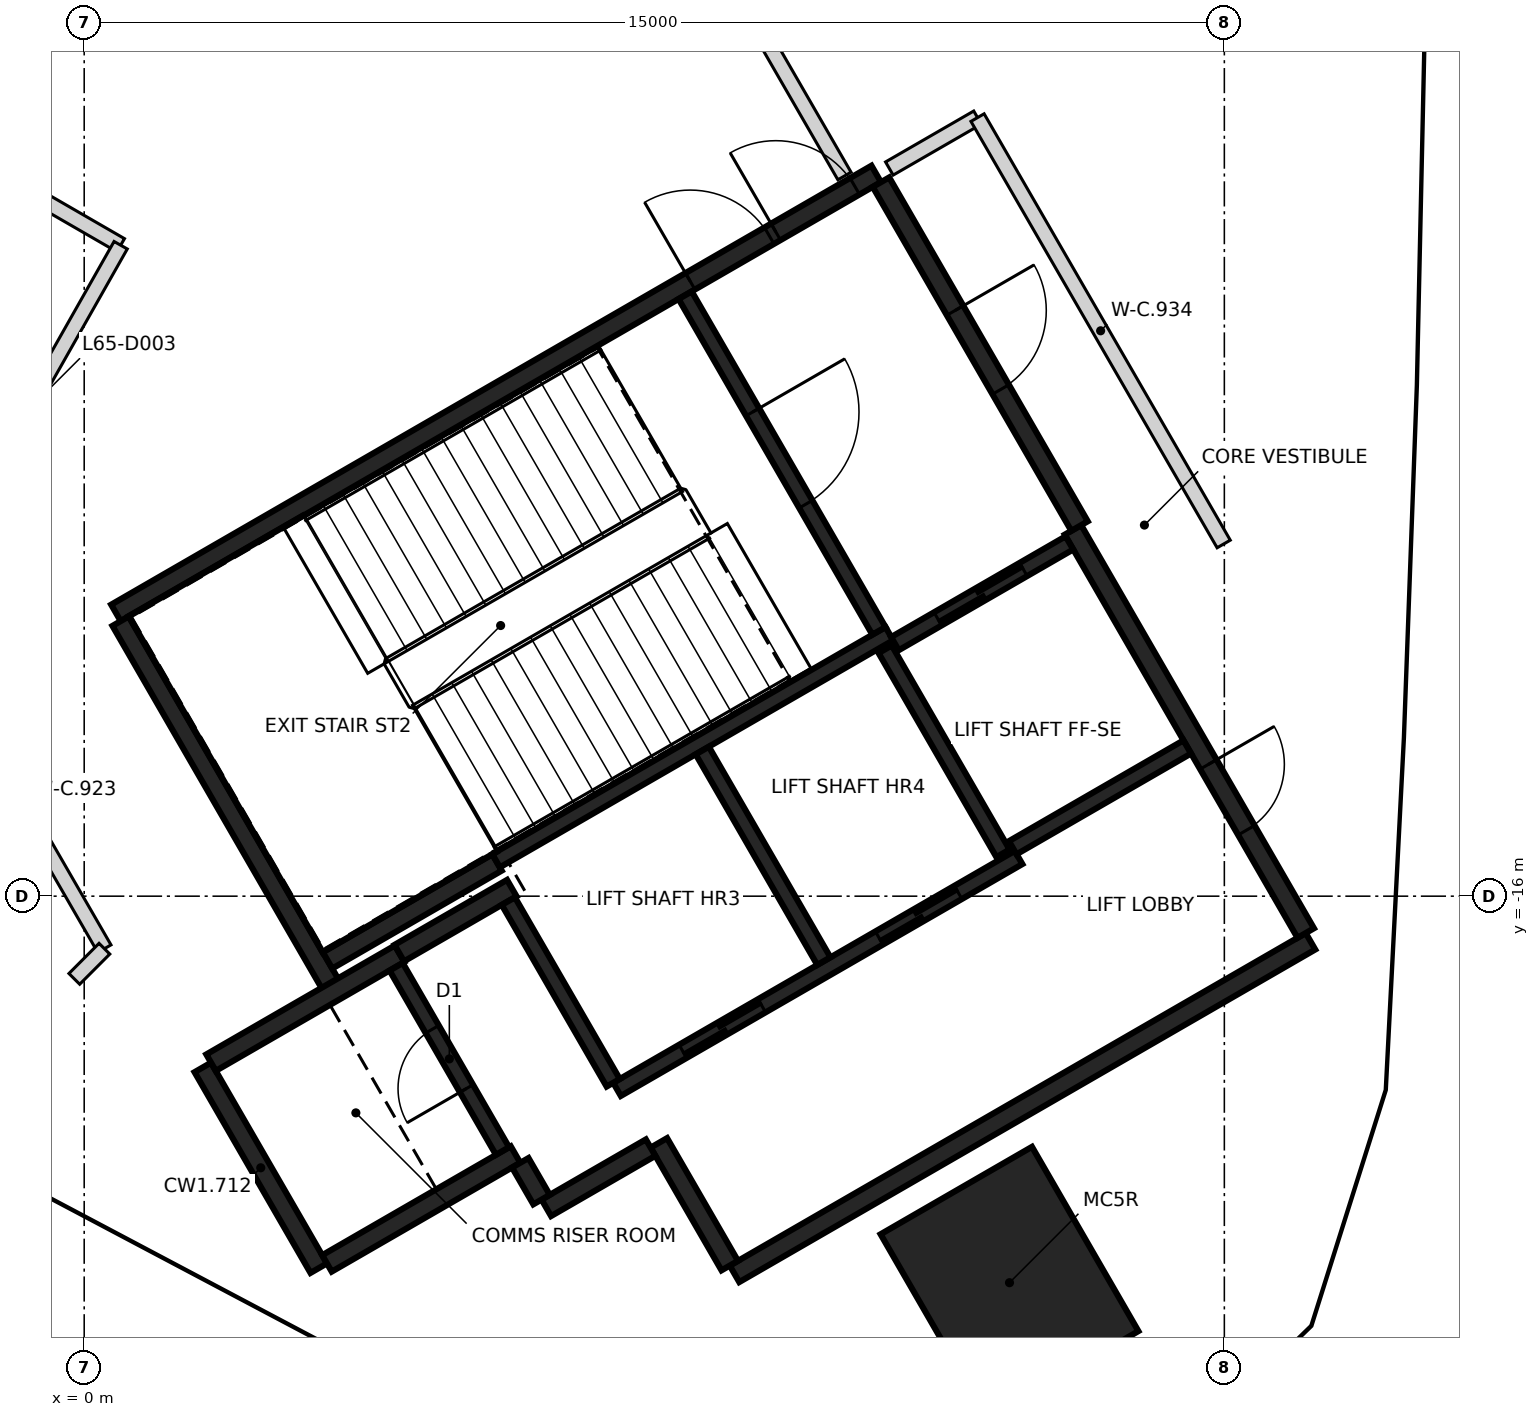
"""IFC4 building model, lengths in metres.
Left out: names, types, materials, properties, quantities, classifications, styles, units other than length and angle.
Written with IfcOpenShell. Run it as: python <this file> out.ifc"""

import sys

from ifc_helpers import new_model, si_unit, direction, frame, frame_2d, origin, origin_2d, place, context, subcontext, project, spatial, rectangle, extrude, element, fill, save


model = new_model("IFC4")
c1 = context("Model", 3, precision=1e-05, world=origin(), true_north=direction((0.0, 1.0)))
c2 = subcontext(c1, "Body", "Model", "MODEL_VIEW")
j1 = project(units=[si_unit("LENGTHUNIT", "METRE"), si_unit("PLANEANGLEUNIT", "RADIAN")], contexts=[c1])
p1 = place(None, origin())
s1 = spatial("IfcSite", under=j1, at=p1, CompositionType="ELEMENT")
p2 = place(p1, origin())
s2 = spatial("IfcBuilding", under=s1, at=p2, CompositionType="ELEMENT")
p3 = place(p2, frame((0.0, 0.0, 257.4)))
s3 = spatial("IfcBuildingStorey", under=s2, at=p3, CompositionType="ELEMENT", Elevation=257.4)
p4 = place(p3, frame((12.173, -21.085, -0.4), z_axis=(0.0, 0.0, 1.0), x_axis=(-0.5, 0.866025403784, 0.0)))
e1 = element("IfcColumn", 1, at=p4, inside=s3, PredefinedType="COLUMN", context=c2, shape_type="SweptSolid", body=[
    extrude(rectangle(XDim=2.8, YDim=2.3, at=origin_2d()), origin(), (0.0, 0.0, 1.0), 4.85),
])
p5 = place(p3, frame((0.417, -12.273, 0.0), z_axis=(0.0, 0.0, 1.0), x_axis=(0.866021906294, 0.500006057782, 0.0)))
e2 = element("IfcWall", 2, at=p5, inside=s3, PredefinedType="SHEAR", context=c2, shape_type="SweptSolid", body=[
    extrude(rectangle(XDim=11.55, YDim=0.25, at=frame_2d((5.775, 0.0))), origin(), (0.0, 0.0, 1.0), 4.45),
])
p6 = place(p5, frame((10.025, 0.0, 0.0)))
e3 = element("IfcOpeningElement", 3, at=p6, cuts=e2, PredefinedType="OPENING", context=c2, shape_type="SweptSolid", body=[
    extrude(rectangle(XDim=1.2, YDim=2.1, at=frame_2d((0.6, 1.05))), frame((0.0, 0.135, 0.0), z_axis=(0.0, -1.0, 0.0), x_axis=(1.0, 0.0, 0.0)), (0.0, 0.0, 1.0), 0.27),
])
p7 = place(p5, frame((8.725, 0.0, 0.0)))
e4 = element("IfcOpeningElement", 4, at=p7, cuts=e2, PredefinedType="OPENING", context=c2, shape_type="SweptSolid", body=[
    extrude(rectangle(XDim=1.2, YDim=2.1, at=frame_2d((0.6, 1.05))), frame((0.0, 0.135, 0.0), z_axis=(0.0, -1.0, 0.0), x_axis=(1.0, 0.0, 0.0)), (0.0, 0.0, 1.0), 0.27),
])
p8 = place(p3, frame((16.133, -16.594, 0.0), z_axis=(0.0, 0.0, 1.0), x_axis=(-0.866022959057, -0.500004234368, 0.0)))
e5 = element("IfcWall", 5, at=p8, inside=s3, PredefinedType="SHEAR", context=c2, shape_type="SweptSolid", body=[
    extrude(rectangle(XDim=8.75, YDim=0.25, at=frame_2d((4.375, 0.0))), origin(), (0.0, 0.0, 1.0), 4.45),
])
p9 = place(p3, frame((13.008, -11.181, 0.0), z_axis=(0.0, 0.0, 1.0), x_axis=(0.500001955336, -0.866024274868, 0.0)))
e6 = element("IfcWall", 6, at=p9, inside=s3, PredefinedType="SHEAR", context=c2, shape_type="SweptSolid", body=[
    extrude(rectangle(XDim=6.125, YDim=0.25, at=frame_2d((3.062, 0.0))), origin(), (0.0, 0.0, 1.0), 4.45),
])
p10 = place(p9, frame((3.563, 0.0, 0.0)))
e7 = element("IfcOpeningElement", 7, at=p10, cuts=e6, PredefinedType="OPENING", context=c2, shape_type="SweptSolid", body=[
    extrude(rectangle(XDim=1.0, YDim=2.1, at=frame_2d((0.5, 1.05))), frame((0.0, 0.135, 0.0), z_axis=(0.0, -1.0, 0.0), x_axis=(1.0, 0.0, 0.0)), (0.0, 0.0, 1.0), 0.27),
])
p11 = place(p3, frame((3.235, -17.153, 0.0), z_axis=(0.0, 0.0, 1.0), x_axis=(-0.500008851346, 0.866020293397, 0.0)))
e8 = element("IfcWall", 8, at=p11, inside=s3, PredefinedType="SHEAR", context=c2, shape_type="SweptSolid", body=[
    extrude(rectangle(XDim=5.51, YDim=0.25, at=frame_2d((2.755, 0.0))), origin(), (0.0, 0.0, 1.0), 4.45),
])
p12 = place(p3, frame((10.483, -6.606, 0.0), z_axis=(0.0, 0.0, 1.0), x_axis=(0.49999885962, -0.866026062182, 0.0)))
e9 = element("IfcWall", 9, at=p12, inside=s3, PredefinedType="SHEAR", context=c2, shape_type="SweptSolid", body=[
    extrude(rectangle(XDim=5.225, YDim=0.25, at=frame_2d((2.612, 0.0))), origin(), (0.0, 0.0, 1.0), 4.45),
])
p13 = place(p12, frame((1.95, 0.0, 0.0)))
e10 = element("IfcOpeningElement", 10, at=p13, cuts=e9, PredefinedType="OPENING", context=c2, shape_type="SweptSolid", body=[
    extrude(rectangle(XDim=1.2, YDim=2.1, at=frame_2d((0.6, 1.05))), frame((0.0, 0.135, 0.0), z_axis=(0.0, -1.0, 0.0), x_axis=(1.0, 0.0, 0.0)), (0.0, 0.0, 1.0), 0.27),
])
p14 = place(p3, frame((3.085, -20.894, 0.0), z_axis=(0.0, 0.0, 1.0), x_axis=(-0.499978833458, 0.866037623948, 0.0)))
e11 = element("IfcWall", 11, at=p14, inside=s3, PredefinedType="SHEAR", context=c2, shape_type="SweptSolid", body=[
    extrude(rectangle(XDim=3.05, YDim=0.25, at=frame_2d((1.525, 0.0))), origin(), (0.0, 0.0, 1.0), 4.45),
])
p15 = place(p3, frame((1.669, -18.19, 0.0), z_axis=(0.0, 0.0, 1.0), x_axis=(0.866042235819, 0.499970844928, 0.0)))
e12 = element("IfcWall", 12, at=p15, inside=s3, PredefinedType="SHEAR", context=c2, shape_type="SweptSolid", body=[
    extrude(rectangle(XDim=2.865, YDim=0.25, at=frame_2d((1.432, 0.0))), origin(), (0.0, 0.0, 1.0), 4.45),
])
p16 = place(p3, frame((5.675, -19.399, 0.0), z_axis=(0.0, 0.0, 1.0), x_axis=(-0.866026637627, -0.499997862916, 0.0)))
e13 = element("IfcWall", 13, at=p16, inside=s3, PredefinedType="SHEAR", context=c2, shape_type="SweptSolid", body=[
    extrude(rectangle(XDim=2.865, YDim=0.25, at=frame_2d((1.432, 0.0))), origin(), (0.0, 0.0, 1.0), 4.45),
])
p17 = place(p3, frame((5.431, -15.556, 0.0), z_axis=(0.0, 0.0, 1.0), x_axis=(-0.866022940537, -0.500004266446, 0.0)))
e14 = element("IfcWall", 14, at=p17, inside=s3, PredefinedType="SHEAR", context=c2, shape_type="SweptSolid", body=[
    extrude(rectangle(XDim=2.575, YDim=0.25, at=frame_2d((1.287, 0.0))), origin(), (0.0, 0.0, 1.0), 4.45),
])
p18 = place(p3, frame((8.493, -20.86, 0.0), z_axis=(0.0, 0.0, 1.0), x_axis=(-0.500039802285, 0.866002422705, 0.0)))
e15 = element("IfcWall", 15, at=p18, inside=s3, PredefinedType="SHEAR", context=c2, shape_type="SweptSolid", body=[
    extrude(rectangle(XDim=1.865, YDim=0.25, at=frame_2d((0.932, 0.0))), origin(), (0.0, 0.0, 1.0), 4.45),
])
p19 = place(p3, frame((4.145, -16.749, 0.0), z_axis=(0.0, 0.0, 1.0), x_axis=(0.866038183914, 0.499977863513, 0.0)))
e16 = element("IfcWall", 16, at=p19, inside=s3, PredefinedType="SHEAR", context=c2, shape_type="SweptSolid", body=[
    extrude(rectangle(XDim=1.71, YDim=0.25, at=frame_2d((0.855, 0.0))), origin(), (0.0, 0.0, 1.0), 4.45),
])
p20 = place(p3, frame((7.452, -19.308, 0.0), z_axis=(0.0, 0.0, 1.0), x_axis=(-0.866044474677, -0.49996696679, 0.0)))
e17 = element("IfcWall", 17, at=p20, inside=s3, PredefinedType="SHEAR", context=c2, shape_type="SweptSolid", body=[
    extrude(rectangle(XDim=1.584, YDim=0.25, at=frame_2d((0.792, 0.0))), origin(), (0.0, 0.0, 1.0), 4.45),
])
p21 = place(p3, frame((6.017, -19.992, 0.0), z_axis=(0.0, 0.0, 1.0), x_axis=(-0.500364886717, 0.865814633822, 0.0)))
e18 = element("IfcWall", 18, at=p21, inside=s3, PredefinedType="SHEAR", context=c2, shape_type="SweptSolid", body=[
    extrude(rectangle(XDim=0.559, YDim=0.25, at=frame_2d((0.28, 0.0))), origin(), (0.0, 0.0, 1.0), 4.45),
])
p22 = place(p3, frame((5.419, -15.534, 0.0), z_axis=(0.0, 0.0, 1.0), x_axis=(0.866029065029, 0.499993658486, 0.0)))
e19 = element("IfcWall", 19, at=p22, inside=s3, PredefinedType="SHEAR", context=c2, shape_type="SweptSolid", body=[
    extrude(rectangle(XDim=5.974, YDim=0.2, at=frame_2d((2.987, 0.0))), origin(), (0.0, 0.0, 1.0), 4.45),
])
p23 = place(p3, frame((7.01, -18.542, 0.0), z_axis=(0.0, 0.0, 1.0), x_axis=(0.866030299012, 0.499991521122, 0.0)))
e20 = element("IfcWall", 20, at=p23, inside=s3, PredefinedType="SHEAR", context=c2, shape_type="SweptSolid", body=[
    extrude(rectangle(XDim=6.1, YDim=0.2, at=frame_2d((3.05, 0.0))), origin(), (0.0, 0.0, 1.0), 4.45),
])
p24 = place(p23, frame((1.0, 0.0, 0.0)))
e21 = element("IfcOpeningElement", 21, at=p24, cuts=e20, PredefinedType="OPENING", context=c2, shape_type="SweptSolid", body=[
    extrude(rectangle(XDim=1.2, YDim=2.1, at=frame_2d((0.6, 1.05))), frame((0.0, 0.11, 0.0), z_axis=(0.0, -1.0, 0.0), x_axis=(1.0, 0.0, 0.0)), (0.0, 0.0, 1.0), 0.22),
])
p25 = place(p23, frame((3.982, 0.0, 0.0)))
e22 = element("IfcOpeningElement", 22, at=p25, cuts=e20, PredefinedType="OPENING", context=c2, shape_type="SweptSolid", body=[
    extrude(rectangle(XDim=1.2, YDim=2.1, at=frame_2d((0.6, 1.05))), frame((0.0, 0.11, 0.0), z_axis=(0.0, -1.0, 0.0), x_axis=(1.0, 0.0, 0.0)), (0.0, 0.0, 1.0), 0.22),
])
p26 = place(p3, frame((7.906, -8.094, 0.0), z_axis=(0.0, 0.0, 1.0), x_axis=(0.500027839223, -0.866009330205, 0.0)))
e23 = element("IfcWall", 23, at=p26, inside=s3, PredefinedType="SHEAR", context=c2, shape_type="SweptSolid", body=[
    extrude(rectangle(XDim=5.098, YDim=0.2, at=frame_2d((2.549, 0.0))), origin(), (0.0, 0.0, 1.0), 4.45),
])
p27 = place(p26, frame((1.774, 0.0, 0.0)))
e24 = element("IfcOpeningElement", 24, at=p27, cuts=e23, PredefinedType="OPENING", context=c2, shape_type="SweptSolid", body=[
    extrude(rectangle(XDim=1.4, YDim=2.1, at=frame_2d((0.7, 1.05))), frame((0.0, 0.11, 0.0), z_axis=(0.0, -1.0, 0.0), x_axis=(1.0, 0.0, 0.0)), (0.0, 0.0, 1.0), 0.22),
])
p28 = place(p3, frame((8.132, -14.084, 0.0), z_axis=(0.0, 0.0, 1.0), x_axis=(0.499997778408, -0.866026686418, 0.0)))
e25 = element("IfcWall", 25, at=p28, inside=s3, PredefinedType="SHEAR", context=c2, shape_type="SweptSolid", body=[
    extrude(rectangle(XDim=3.198, YDim=0.2, at=frame_2d((1.599, 0.0))), origin(), (0.0, 0.0, 1.0), 4.45),
])
p29 = place(p3, frame((5.503, -19.352, 0.0), z_axis=(0.0, 0.0, 1.0), x_axis=(-0.499986818241, 0.866033014143, 0.0)))
e26 = element("IfcWall", 26, at=p29, inside=s3, PredefinedType="SHEAR", context=c2, shape_type="SweptSolid", body=[
    extrude(rectangle(XDim=2.798, YDim=0.2, at=frame_2d((1.399, 0.0))), origin(), (0.0, 0.0, 1.0), 4.45),
])
p30 = place(p29, frame((0.949, 0.0, 0.0)))
e27 = element("IfcOpeningElement", 27, at=p30, cuts=e26, PredefinedType="OPENING", context=c2, shape_type="SweptSolid", body=[
    extrude(rectangle(XDim=0.9, YDim=2.1, at=frame_2d((0.45, 1.05))), frame((0.0, 0.11, 0.0), z_axis=(0.0, -1.0, 0.0), x_axis=(1.0, 0.0, 0.0)), (0.0, 0.0, 1.0), 0.22),
])
p31 = place(p3, frame((6.96, -18.455, 0.0), z_axis=(0.0, 0.0, 1.0), x_axis=(-0.499926705758, 0.866067716099, 0.0)))
e28 = element("IfcWall", 28, at=p31, inside=s3, PredefinedType="SHEAR", context=c2, shape_type="SweptSolid", body=[
    extrude(rectangle(XDim=2.759, YDim=0.2, at=frame_2d((1.38, 0.0))), origin(), (0.0, 0.0, 1.0), 4.45),
])
p32 = place(p3, frame((12.088, -15.437, 0.0), z_axis=(0.0, 0.0, 1.0), x_axis=(-0.500026960575, 0.86600983753, 0.0)))
e29 = element("IfcWall", 29, at=p32, inside=s3, PredefinedType="SHEAR", context=c2, shape_type="SweptSolid", body=[
    extrude(rectangle(XDim=3.1, YDim=0.2, at=frame_2d((1.55, 0.0))), origin(), (0.0, 0.0, 1.0), 4.45),
])
p33 = place(p3, frame((10.666, -12.678, 0.0), z_axis=(0.0, 0.0, 1.0), x_axis=(0.866018407898, 0.500012117035, 0.0)))
e30 = element("IfcWall", 30, at=p33, inside=s3, PredefinedType="SHEAR", context=c2, shape_type="SweptSolid", body=[
    extrude(rectangle(XDim=2.651, YDim=0.2, at=frame_2d((1.325, 0.0))), origin(), (0.0, 0.0, 1.0), 4.45),
])
p34 = place(p33, frame((0.652, 0.0, 0.0)))
e31 = element("IfcOpeningElement", 31, at=p34, cuts=e30, PredefinedType="OPENING", context=c2, shape_type="SweptSolid", body=[
    extrude(rectangle(XDim=1.3, YDim=2.1, at=frame_2d((0.65, 1.05))), frame((0.0, 0.11, 0.0), z_axis=(0.0, -1.0, 0.0), x_axis=(1.0, 0.0, 0.0)), (0.0, 0.0, 1.0), 0.22),
])
p35 = place(p3, frame((14.512, -14.037, 0.0), z_axis=(0.0, 0.0, 1.0), x_axis=(-0.866018407898, -0.500012117035, 0.0)))
e32 = element("IfcWall", 32, at=p35, inside=s3, PredefinedType="SHEAR", context=c2, shape_type="SweptSolid", body=[
    extrude(rectangle(XDim=2.651, YDim=0.2, at=frame_2d((1.325, 0.0))), origin(), (0.0, 0.0, 1.0), 4.45),
])
p36 = place(p3, frame((-7.188, -3.007, 0.0), z_axis=(0.0, 0.0, 1.0), x_axis=(0.865946804656, -0.500136112979, 0.0)))
e33 = element("IfcWall", 33, at=p36, inside=s3, PredefinedType="PARTITIONING", context=c2, shape_type="SweptSolid", body=[
    extrude(rectangle(XDim=8.855, YDim=0.2, at=frame_2d((4.427, 0.0))), origin(), (0.0, 0.0, 1.0), 4.45),
])
p37 = place(p36, frame((2.418, 0.0, 0.0)))
e34 = element("IfcOpeningElement", 34, at=p37, cuts=e33, PredefinedType="OPENING", context=c2, shape_type="SweptSolid", body=[
    extrude(rectangle(XDim=1.2, YDim=2.1, at=frame_2d((0.6, 1.05))), frame((0.0, 0.11, 0.0), z_axis=(0.0, -1.0, 0.0), x_axis=(1.0, 0.0, 0.0)), (0.0, 0.0, 1.0), 0.22),
])
p38 = place(p3, frame((-2.002, -11.819, 0.0), z_axis=(0.0, 0.0, 1.0), x_axis=(0.492742275982, 0.870175298121, 0.0)))
e35 = element("IfcWall", 35, at=p38, inside=s3, PredefinedType="PARTITIONING", context=c2, shape_type="SweptSolid", body=[
    extrude(rectangle(XDim=5.037, YDim=0.2, at=frame_2d((2.519, 0.0))), origin(), (0.0, 0.0, 1.0), 4.45),
])
p39 = place(p38, frame((2.016, 0.0, 0.0)))
e36 = element("IfcOpeningElement", 36, at=p39, cuts=e35, PredefinedType="OPENING", context=c2, shape_type="SweptSolid", body=[
    extrude(rectangle(XDim=1.0, YDim=2.1, at=frame_2d((0.5, 1.05))), frame((0.0, 0.11, 0.0), z_axis=(0.0, -1.0, 0.0), x_axis=(1.0, 0.0, 0.0)), (0.0, 0.0, 1.0), 0.22),
])
p40 = place(p3, frame((-1.841, -13.041, 0.0), z_axis=(0.0, 0.0, 1.0), x_axis=(0.499983206745, -0.866035099158, 0.0)))
e37 = element("IfcWall", 37, at=p40, inside=s3, PredefinedType="PARTITIONING", context=c2, shape_type="SweptSolid", body=[
    extrude(rectangle(XDim=4.215, YDim=0.2, at=frame_2d((2.107, 0.0))), origin(), (0.0, 0.0, 1.0), 4.45),
])
p41 = place(p3, frame((-0.13, -17.088, 0.0), z_axis=(0.0, 0.0, 1.0), x_axis=(0.706235424469, 0.707977065466, 0.0)))
e38 = element("IfcWall", 38, at=p41, inside=s3, PredefinedType="PARTITIONING", context=c2, shape_type="SweptSolid", body=[
    extrude(rectangle(XDim=0.561, YDim=0.2, at=frame_2d((0.28, 0.0))), origin(), (0.0, 0.0, 1.0), 4.45),
])
p42 = place(p3, frame((8.961, -4.721, 0.0), z_axis=(0.0, 0.0, 1.0), x_axis=(0.499806992981, -0.866136807766, 0.0)))
e39 = element("IfcWall", 39, at=p42, inside=s3, PredefinedType="PARTITIONING", context=c2, shape_type="SweptSolid", body=[
    extrude(rectangle(XDim=2.083, YDim=0.2, at=frame_2d((1.042, 0.0))), origin(), (0.0, 0.0, 1.0), 4.45),
])
p43 = place(p3, frame((10.593, -6.427, 0.0), z_axis=(0.0, 0.0, 1.0), x_axis=(0.865912429188, 0.500195626709, 0.0)))
e40 = element("IfcWall", 40, at=p43, inside=s3, PredefinedType="PARTITIONING", context=c2, shape_type="SweptSolid", body=[
    extrude(rectangle(XDim=1.34, YDim=0.2, at=frame_2d((0.67, 0.0))), origin(), (0.0, 0.0, 1.0), 4.45),
])
p44 = place(p3, frame((11.753, -5.757, 0.0), z_axis=(0.0, 0.0, 1.0), x_axis=(0.499994352157, -0.866028664543, 0.0)))
e41 = element("IfcWall", 41, at=p44, inside=s3, PredefinedType="PARTITIONING", context=c2, shape_type="SweptSolid", body=[
    extrude(rectangle(XDim=6.477, YDim=0.2, at=frame_2d((3.239, 0.0))), origin(), (0.0, 0.0, 1.0), 4.45),
])
p45 = place(p34, origin())
e42 = element("IfcDoor", 42, at=p45, inside=s3, OperationType="SLIDING_TO_LEFT", PredefinedType="DOOR", context=c2, shape_type="SweptSolid", body=[
    extrude(rectangle(XDim=1.3, YDim=2.1, at=frame_2d((0.65, 1.05))), frame((0.0, 0.025, 0.0), z_axis=(0.0, -1.0, 0.0), x_axis=(1.0, 0.0, 0.0)), (0.0, 0.0, 1.0), 0.05),
])
fill(e31, e42)
p46 = place(p24, origin())
e43 = element("IfcDoor", 43, at=p46, inside=s3, OperationType="DOUBLE_DOOR_SLIDING", PredefinedType="DOOR", context=c2, shape_type="SweptSolid", body=[
    extrude(rectangle(XDim=1.2, YDim=2.1, at=frame_2d((0.6, 1.05))), frame((0.0, 0.025, 0.0), z_axis=(0.0, -1.0, 0.0), x_axis=(1.0, 0.0, 0.0)), (0.0, 0.0, 1.0), 0.05),
])
fill(e21, e43)
p47 = place(p25, origin())
e44 = element("IfcDoor", 44, at=p47, inside=s3, OperationType="DOUBLE_DOOR_SLIDING", PredefinedType="DOOR", context=c2, shape_type="SweptSolid", body=[
    extrude(rectangle(XDim=1.2, YDim=2.1, at=frame_2d((0.6, 1.05))), frame((0.0, 0.025, 0.0), z_axis=(0.0, -1.0, 0.0), x_axis=(1.0, 0.0, 0.0)), (0.0, 0.0, 1.0), 0.05),
])
fill(e22, e44)
p48 = place(p10, origin())
e45 = element("IfcDoor", 45, at=p48, inside=s3, OperationType="SINGLE_SWING_LEFT", PredefinedType="DOOR", context=c2, shape_type="SweptSolid", body=[
    extrude(rectangle(XDim=1.0, YDim=2.1, at=frame_2d((0.5, 1.05))), frame((0.0, 0.025, 0.0), z_axis=(0.0, -1.0, 0.0), x_axis=(1.0, 0.0, 0.0)), (0.0, 0.0, 1.0), 0.05),
])
fill(e7, e45)
p49 = place(p6, origin())
e46 = element("IfcDoor", 46, at=p49, inside=s3, OperationType="SINGLE_SWING_LEFT", PredefinedType="DOOR", context=c2, shape_type="SweptSolid", body=[
    extrude(rectangle(XDim=1.2, YDim=2.1, at=frame_2d((0.6, 1.05))), frame((0.0, 0.025, 0.0), z_axis=(0.0, -1.0, 0.0), x_axis=(1.0, 0.0, 0.0)), (0.0, 0.0, 1.0), 0.05),
])
fill(e3, e46)
p50 = place(p7, origin())
e47 = element("IfcDoor", 47, at=p50, inside=s3, OperationType="SINGLE_SWING_RIGHT", PredefinedType="DOOR", context=c2, shape_type="SweptSolid", body=[
    extrude(rectangle(XDim=1.2, YDim=2.1, at=frame_2d((0.6, 1.05))), frame((0.0, 0.025, 0.0), z_axis=(0.0, -1.0, 0.0), x_axis=(1.0, 0.0, 0.0)), (0.0, 0.0, 1.0), 0.05),
])
fill(e4, e47)
p51 = place(p27, origin())
e48 = element("IfcDoor", 48, at=p51, inside=s3, OperationType="SINGLE_SWING_LEFT", PredefinedType="DOOR", context=c2, shape_type="SweptSolid", body=[
    extrude(rectangle(XDim=1.4, YDim=2.1, at=frame_2d((0.7, 1.05))), frame((0.0, 0.025, 0.0), z_axis=(0.0, -1.0, 0.0), x_axis=(1.0, 0.0, 0.0)), (0.0, 0.0, 1.0), 0.05),
])
fill(e24, e48)
p52 = place(p30, origin())
e49 = element("IfcDoor", 49, at=p52, inside=s3, OperationType="SINGLE_SWING_RIGHT", PredefinedType="DOOR", context=c2, shape_type="SweptSolid", body=[
    extrude(rectangle(XDim=0.9, YDim=2.1, at=frame_2d((0.45, 1.05))), frame((0.0, 0.025, 0.0), z_axis=(0.0, -1.0, 0.0), x_axis=(1.0, 0.0, 0.0)), (0.0, 0.0, 1.0), 0.05),
])
fill(e27, e49)
p53 = place(p13, origin())
e50 = element("IfcDoor", 50, at=p53, inside=s3, OperationType="SINGLE_SWING_RIGHT", PredefinedType="DOOR", context=c2, shape_type="SweptSolid", body=[
    extrude(rectangle(XDim=1.2, YDim=2.1, at=frame_2d((0.6, 1.05))), frame((0.0, 0.025, 0.0), z_axis=(0.0, -1.0, 0.0), x_axis=(1.0, 0.0, 0.0)), (0.0, 0.0, 1.0), 0.05),
])
fill(e10, e50)
save(model, sys.argv[1])
